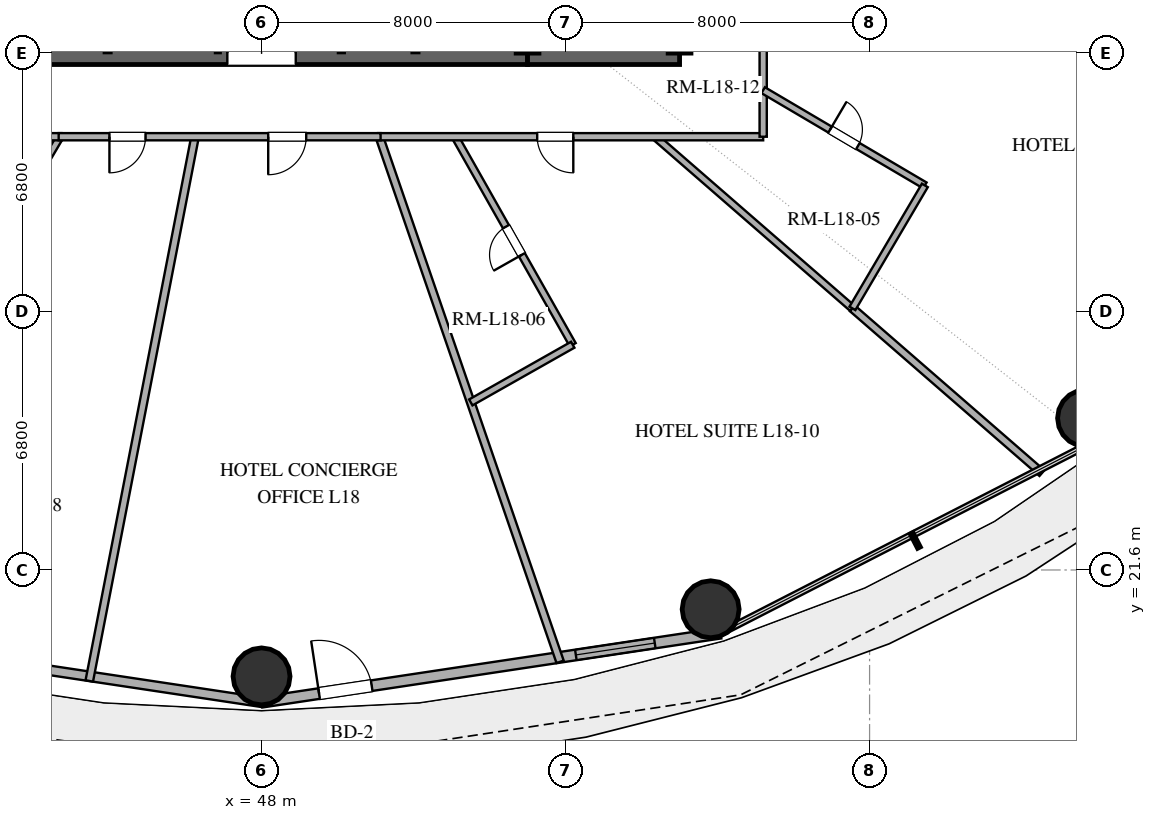
"""IFC4 building model, lengths in metres.
Left out: names, types, materials, properties, quantities, classifications, styles, units other than length and angle.
Written with IfcOpenShell. Run it as: python <this file> out.ifc"""

import sys

from ifc_helpers import new_model, si_unit, direction, frame, frame_2d, origin, origin_2d, place, context, subcontext, project, spatial, rectangle, hollow_circle, extrude, element, fill, save


model = new_model("IFC4")
c1 = context("Model", 3, precision=1e-05, world=origin(), true_north=direction((0.0, 1.0)))
c2 = subcontext(c1, "Body", "Model", "MODEL_VIEW")
j1 = project(units=[si_unit("LENGTHUNIT", "METRE"), si_unit("PLANEANGLEUNIT", "RADIAN")], contexts=[c1])
p1 = place(None, origin())
s1 = spatial("IfcSite", under=j1, at=p1, CompositionType="ELEMENT")
p2 = place(p1, origin())
s2 = spatial("IfcBuilding", under=s1, at=p2, CompositionType="ELEMENT")
p3 = place(p2, frame((0.0, 0.0, 75.0)))
s3 = spatial("IfcBuildingStorey", under=s2, at=p3, CompositionType="ELEMENT", Elevation=75.0)
p4 = place(p3, frame((41.0, 35.2, 0.0), z_axis=(0.0, 0.0, 1.0), x_axis=(1.0, 0.0, 0.0)))
e1 = element("IfcWall", 1, at=p4, inside=s3, PredefinedType="SHEAR", context=c2, shape_type="SweptSolid", body=[
    extrude(rectangle(XDim=14.0, YDim=0.6, at=frame_2d((7.0, 0.0))), origin(), (0.0, 0.0, 1.0), 3.25),
])
p5 = place(p4, frame((6.1, 0.0, 0.0)))
e2 = element("IfcOpeningElement", 2, at=p5, cuts=e1, PredefinedType="OPENING", context=c2, shape_type="SweptSolid", body=[
    extrude(rectangle(XDim=1.8, YDim=2.25, at=frame_2d((0.9, 1.125))), frame((0.0, 0.31, 0.0), z_axis=(0.0, -1.0, 0.0), x_axis=(1.0, 0.0, 0.0)), (0.0, 0.0, 1.0), 0.62),
])
p6 = place(p3, frame((55.0, 35.2, 0.0), z_axis=(0.0, 0.0, 1.0), x_axis=(1.0, 0.0, 0.0)))
e3 = element("IfcWall", 3, at=p6, inside=s3, PredefinedType="SHEAR", context=c2, shape_type="SweptSolid", body=[
    extrude(rectangle(XDim=4.0, YDim=0.6, at=frame_2d((2.0, 0.0))), origin(), (0.0, 0.0, 1.0), 3.25),
])
p7 = place(p3, frame((59.0, 35.2, 0.0), z_axis=(0.0, 0.0, 1.0), x_axis=(0.0, 1.0, 0.0)))
e4 = element("IfcWall", 4, at=p7, inside=s3, PredefinedType="SHEAR", context=c2, shape_type="SweptSolid", body=[
    extrude(rectangle(XDim=13.6, YDim=0.6, at=frame_2d((6.8, 0.0))), origin(), (0.0, 0.0, 1.0), 3.25),
])
p8 = place(p7, frame((1.5, 0.0, 0.0)))
e5 = element("IfcOpeningElement", 5, at=p8, cuts=e4, PredefinedType="OPENING", context=c2, shape_type="SweptSolid", body=[
    extrude(rectangle(XDim=1.2, YDim=2.15, at=frame_2d((0.6, 1.075))), frame((0.0, 0.31, 0.0), z_axis=(0.0, -1.0, 0.0), x_axis=(1.0, 0.0, 0.0)), (0.0, 0.0, 1.0), 0.62),
])
p9 = place(p3, frame((55.0, 35.2, 0.0), z_axis=(0.0, 0.0, 1.0), x_axis=(0.0, 1.0, 0.0)))
e6 = element("IfcWall", 6, at=p9, inside=s3, PredefinedType="SHEAR", context=c2, shape_type="SweptSolid", body=[
    extrude(rectangle(XDim=13.6, YDim=0.6, at=frame_2d((6.8, 0.0))), origin(), (0.0, 0.0, 1.0), 3.25),
])
p10 = place(p9, frame((1.15, 0.0, 0.0)))
e7 = element("IfcOpeningElement", 7, at=p10, cuts=e6, PredefinedType="OPENING", context=c2, shape_type="SweptSolid", body=[
    extrude(rectangle(XDim=1.1, YDim=2.2, at=frame_2d((0.55, 1.1))), frame((0.0, 0.31, 0.0), z_axis=(0.0, -1.0, 0.0), x_axis=(1.0, 0.0, 0.0)), (0.0, 0.0, 1.0), 0.62),
])
for number, where, z_axis, x_axis in (
    (8, (48.0, 18.8, 0.0), (0.0, 0.0, 1.0), (1.0, 0.0, 0.0)),
    (9, (59.818, 20.566, 0.0), (0.0, 0.0, 1.0), (1.0, 0.0, 0.0)),
    (10, (69.697, 25.595, 0.0), (0.0, 0.0, 1.0), (1.0, 0.0, 0.0)),
):
    element("IfcColumn", number, at=place(p3, frame(where, z_axis=z_axis, x_axis=x_axis)), inside=s3, PredefinedType="COLUMN", context=c2, shape_type="SweptSolid", body=[
        extrude(hollow_circle(Radius=0.75, WallThickness=0.04, at=origin_2d()), origin(), (0.0, 0.0, 1.0), 3.25),
    ])
p11 = place(p3, frame((35.922, 19.938, 0.0), z_axis=(0.0, 0.0, 1.0), x_axis=(0.988864835849, -0.148816452121, 0.0)))
e11 = element("IfcWall", 11, at=p11, inside=s3, PredefinedType="SOLIDWALL", context=c2, shape_type="SweptSolid", body=[
    extrude(rectangle(XDim=12.214, YDim=0.25, at=frame_2d((6.107, 0.0))), origin(), (0.0, 0.0, 1.0), 3.25),
])
p12 = place(p3, frame((48.0, 18.12, 0.0), z_axis=(0.0, 0.0, 1.0), x_axis=(0.988864835849, 0.148816452121, 0.0)))
e12 = element("IfcWall", 12, at=p12, inside=s3, PredefinedType="SOLIDWALL", context=c2, shape_type="SweptSolid", body=[
    extrude(rectangle(XDim=12.214, YDim=0.28, at=frame_2d((6.107, 0.0))), origin(), (0.0, 0.0, 1.0), 3.25),
])
p13 = place(p12, frame((1.531, 0.0, 0.0)))
e13 = element("IfcOpeningElement", 13, at=p13, cuts=e12, PredefinedType="OPENING", context=c2, shape_type="SweptSolid", body=[
    extrude(rectangle(XDim=1.4, YDim=2.2, at=frame_2d((0.7, 1.1))), frame((0.0, 0.15, 0.0), z_axis=(0.0, -1.0, 0.0), x_axis=(1.0, 0.0, 0.0)), (0.0, 0.0, 1.0), 0.3),
])
p14 = place(p12, frame((8.364, 0.0, 0.85)))
e14 = element("IfcOpeningElement", 14, at=p14, cuts=e12, PredefinedType="OPENING", context=c2, shape_type="SweptSolid", body=[
    extrude(rectangle(XDim=2.1, YDim=2.2, at=frame_2d((1.05, 1.1))), frame((0.0, 0.15, 0.0), z_axis=(0.0, -1.0, 0.0), x_axis=(1.0, 0.0, 0.0)), (0.0, 0.0, 1.0), 0.3),
])
for number, where, z_axis, x_axis in (
    (15, (43.95, 35.2, 0.0), (0.0, 0.0, 1.0), (0.0, 1.0, 0.0)),
    (16, (52.05, 35.2, 0.0), (0.0, 0.0, 1.0), (0.0, 1.0, 0.0)),
):
    element("IfcWall", number, at=place(p3, frame(where, z_axis=z_axis, x_axis=x_axis)), inside=s3, PredefinedType="SOLIDWALL", context=c2, shape_type="SweptSolid", body=[
        extrude(rectangle(XDim=3.2, YDim=0.2, at=frame_2d((1.6, 0.0))), origin(), (0.0, 0.0, 1.0), 2.61),
    ])
p15 = place(p3, frame((46.85, 35.2, 0.0), z_axis=(0.0, 0.0, 1.0), x_axis=(0.0, 1.0, 0.0)))
e17 = element("IfcWall", 17, at=p15, inside=s3, PredefinedType="PARTITIONING", context=c2, shape_type="SweptSolid", body=[
    extrude(rectangle(XDim=3.2, YDim=0.15, at=frame_2d((1.6, 0.0))), origin(), (0.0, 0.0, 1.0), 2.61),
])
p16 = place(p15, frame((1.15, 0.0, 0.0)))
e18 = element("IfcOpeningElement", 18, at=p16, cuts=e17, PredefinedType="OPENING", context=c2, shape_type="SweptSolid", body=[
    extrude(rectangle(XDim=0.9, YDim=2.15, at=frame_2d((0.45, 1.075))), frame((0.0, 0.085, 0.0), z_axis=(0.0, -1.0, 0.0), x_axis=(1.0, 0.0, 0.0)), (0.0, 0.0, 1.0), 0.17),
])
p17 = place(p3, frame((50.1, 35.2, 0.0), z_axis=(0.0, 0.0, 1.0), x_axis=(0.0, 1.0, 0.0)))
e19 = element("IfcWall", 19, at=p17, inside=s3, PredefinedType="PLUMBINGWALL", context=c2, shape_type="SweptSolid", body=[
    extrude(rectangle(XDim=2.45, YDim=0.18, at=frame_2d((1.225, 0.0))), origin(), (0.0, 0.0, 1.0), 2.61),
])
p18 = place(p17, frame((0.75, 0.0, 0.0)))
e20 = element("IfcOpeningElement", 20, at=p18, cuts=e19, PredefinedType="OPENING", context=c2, shape_type="SweptSolid", body=[
    extrude(rectangle(XDim=0.85, YDim=2.1, at=frame_2d((0.425, 1.05))), frame((0.0, 0.1, 0.0), z_axis=(0.0, -1.0, 0.0), x_axis=(1.0, 0.0, 0.0)), (0.0, 0.0, 1.0), 0.2),
])
p19 = place(p3, frame((43.467, 18.681, 0.0), z_axis=(0.0, 0.0, 1.0), x_axis=(0.190799326792, 0.981629062781, 0.0)))
e21 = element("IfcWall", 21, at=p19, inside=s3, PredefinedType="PARTITIONING", context=c2, shape_type="SweptSolid", body=[
    extrude(rectangle(XDim=14.587, YDim=0.2, at=frame_2d((7.293, 0.0))), origin(), (0.0, 0.0, 1.0), 2.61),
])
p20 = place(p3, frame((51.099, 33.0, 0.0), z_axis=(0.0, 0.0, 1.0), x_axis=(0.325569992405, -0.945517942741, 0.0)))
e22 = element("IfcWall", 22, at=p20, inside=s3, PredefinedType="PARTITIONING", context=c2, shape_type="SweptSolid", body=[
    extrude(rectangle(XDim=14.613, YDim=0.2, at=frame_2d((7.307, 0.0))), origin(), (0.0, 0.0, 1.0), 2.61),
])
p21 = place(p3, frame((39.193, 27.048, 0.0), z_axis=(0.0, 0.0, 1.0), x_axis=(0.507529744585, 0.861634236995, 0.0)))
e23 = element("IfcWall", 23, at=p21, inside=s3, PredefinedType="PLUMBINGWALL", context=c2, shape_type="SweptSolid", body=[
    extrude(rectangle(XDim=6.908, YDim=0.18, at=frame_2d((3.454, 0.0))), origin(), (0.0, 0.0, 1.0), 2.61),
])
p22 = place(p21, frame((3.029, 0.0, 0.0)))
e24 = element("IfcOpeningElement", 24, at=p22, cuts=e23, PredefinedType="OPENING", context=c2, shape_type="SweptSolid", body=[
    extrude(rectangle(XDim=0.85, YDim=2.1, at=frame_2d((0.425, 1.05))), frame((0.0, 0.1, 0.0), z_axis=(0.0, -1.0, 0.0), x_axis=(1.0, 0.0, 0.0)), (0.0, 0.0, 1.0), 0.2),
])
p23 = place(p3, frame((63.549, 28.484, 0.0), z_axis=(0.0, 0.0, 1.0), x_axis=(-0.754699426586, 0.65607070923, 0.0)))
e25 = element("IfcWall", 25, at=p23, inside=s3, PredefinedType="PLUMBINGWALL", context=c2, shape_type="SweptSolid", body=[
    extrude(rectangle(XDim=6.884, YDim=0.18, at=frame_2d((3.442, 0.0))), origin(), (0.0, 0.0, 1.0), 2.61),
])
p24 = place(p3, frame((68.535, 24.149, 0.0), z_axis=(0.0, 0.0, 1.0), x_axis=(-0.754728806145, 0.656036911442, 0.0)))
e26 = element("IfcWall", 26, at=p24, inside=s3, PredefinedType="PARTITIONING", context=c2, shape_type="SweptSolid", body=[
    extrude(rectangle(XDim=6.607, YDim=0.2, at=frame_2d((3.304, 0.0))), origin(), (0.0, 0.0, 1.0), 2.61),
])
p25 = place(p3, frame((56.189, 27.527, 0.0), z_axis=(0.0, 0.0, 1.0), x_axis=(-0.492421798109, 0.870356692826, 0.0)))
e27 = element("IfcWall", 27, at=p25, inside=s3, PredefinedType="PLUMBINGWALL", context=c2, shape_type="SweptSolid", body=[
    extrude(rectangle(XDim=6.289, YDim=0.18, at=frame_2d((3.144, 0.0))), origin(), (0.0, 0.0, 1.0), 2.61),
])
p26 = place(p25, frame((2.719, 0.0, 0.0)))
e28 = element("IfcOpeningElement", 28, at=p26, cuts=e27, PredefinedType="OPENING", context=c2, shape_type="SweptSolid", body=[
    extrude(rectangle(XDim=0.85, YDim=2.1, at=frame_2d((0.425, 1.05))), frame((0.0, 0.1, 0.0), z_axis=(0.0, -1.0, 0.0), x_axis=(1.0, 0.0, 0.0)), (0.0, 0.0, 1.0), 0.2),
])
p27 = place(p3, frame((42.736, 33.0, 0.0), z_axis=(0.0, 0.0, 1.0), x_axis=(-1.0, 0.0, 0.0)))
e29 = element("IfcWall", 29, at=p27, inside=s3, PredefinedType="PARTITIONING", context=c2, shape_type="SweptSolid", body=[
    extrude(rectangle(XDim=7.936, YDim=0.19, at=frame_2d((3.968, 0.0))), origin(), (0.0, 0.0, 1.0), 2.61),
])
p28 = place(p27, frame((4.751, 0.0, 0.0)))
e30 = element("IfcOpeningElement", 30, at=p28, cuts=e29, PredefinedType="OPENING", context=c2, shape_type="SweptSolid", body=[
    extrude(rectangle(XDim=0.95, YDim=2.15, at=frame_2d((0.475, 1.075))), frame((0.0, 0.105, 0.0), z_axis=(0.0, -1.0, 0.0), x_axis=(1.0, 0.0, 0.0)), (0.0, 0.0, 1.0), 0.21),
])
p29 = place(p3, frame((61.2, 33.0, 0.0), z_axis=(0.0, 0.0, 1.0), x_axis=(-1.0, 0.0, 0.0)))
e31 = element("IfcWall", 31, at=p29, inside=s3, PredefinedType="PARTITIONING", context=c2, shape_type="SweptSolid", body=[
    extrude(rectangle(XDim=10.135, YDim=0.19, at=frame_2d((5.067, 0.0))), origin(), (0.0, 0.0, 1.0), 2.61),
])
p30 = place(p29, frame((4.996, 0.0, 0.0)))
e32 = element("IfcOpeningElement", 32, at=p30, cuts=e31, PredefinedType="OPENING", context=c2, shape_type="SweptSolid", body=[
    extrude(rectangle(XDim=0.95, YDim=2.15, at=frame_2d((0.475, 1.075))), frame((0.0, 0.105, 0.0), z_axis=(0.0, -1.0, 0.0), x_axis=(1.0, 0.0, 0.0)), (0.0, 0.0, 1.0), 0.21),
])
p31 = place(p3, frame((61.2, 41.917, 0.0), z_axis=(0.0, 0.0, 1.0), x_axis=(0.0, -1.0, 0.0)))
e33 = element("IfcWall", 33, at=p31, inside=s3, PredefinedType="PARTITIONING", context=c2, shape_type="SweptSolid", body=[
    extrude(rectangle(XDim=8.917, YDim=0.19, at=frame_2d((4.458, 0.0))), origin(), (0.0, 0.0, 1.0), 2.61),
])
p32 = place(p31, frame((4.615, 0.0, 0.0)))
e34 = element("IfcOpeningElement", 34, at=p32, cuts=e33, PredefinedType="OPENING", context=c2, shape_type="SweptSolid", body=[
    extrude(rectangle(XDim=0.95, YDim=2.15, at=frame_2d((0.475, 1.075))), frame((0.0, 0.105, 0.0), z_axis=(0.0, -1.0, 0.0), x_axis=(1.0, 0.0, 0.0)), (0.0, 0.0, 1.0), 0.21),
])
p33 = place(p3, frame((61.2, 34.225, 0.0), z_axis=(0.0, 0.0, 1.0), x_axis=(0.861622640197, -0.507549431977, 0.0)))
e35 = element("IfcWall", 35, at=p33, inside=s3, PredefinedType="PLUMBINGWALL", context=c2, shape_type="SweptSolid", body=[
    extrude(rectangle(XDim=4.938, YDim=0.18, at=frame_2d((2.469, 0.0))), origin(), (0.0, 0.0, 1.0), 2.61),
])
p34 = place(p33, frame((2.044, 0.0, 0.0)))
e36 = element("IfcOpeningElement", 36, at=p34, cuts=e35, PredefinedType="OPENING", context=c2, shape_type="SweptSolid", body=[
    extrude(rectangle(XDim=0.85, YDim=2.1, at=frame_2d((0.425, 1.05))), frame((0.0, 0.1, 0.0), z_axis=(0.0, -1.0, 0.0), x_axis=(1.0, 0.0, 0.0)), (0.0, 0.0, 1.0), 0.2),
])
p35 = place(p3, frame((51.133, 33.0, 0.0), z_axis=(0.0, 0.0, 1.0), x_axis=(-1.0, 0.0, 0.0)))
e37 = element("IfcWall", 37, at=p35, inside=s3, PredefinedType="PARTITIONING", context=c2, shape_type="SweptSolid", body=[
    extrude(rectangle(XDim=8.471, YDim=0.19, at=frame_2d((4.236, 0.0))), origin(), (0.0, 0.0, 1.0), 2.61),
])
p36 = place(p35, frame((1.957, 0.0, 0.0)))
e38 = element("IfcOpeningElement", 38, at=p36, cuts=e37, PredefinedType="OPENING", context=c2, shape_type="SweptSolid", body=[
    extrude(rectangle(XDim=1.0, YDim=2.2, at=frame_2d((0.5, 1.1))), frame((0.0, 0.105, 0.0), z_axis=(0.0, -1.0, 0.0), x_axis=(1.0, 0.0, 0.0)), (0.0, 0.0, 1.0), 0.21),
])
p37 = place(p35, frame((6.185, 0.0, 0.0)))
e39 = element("IfcOpeningElement", 39, at=p37, cuts=e37, PredefinedType="OPENING", context=c2, shape_type="SweptSolid", body=[
    extrude(rectangle(XDim=0.95, YDim=2.15, at=frame_2d((0.475, 1.075))), frame((0.0, 0.105, 0.0), z_axis=(0.0, -1.0, 0.0), x_axis=(1.0, 0.0, 0.0)), (0.0, 0.0, 1.0), 0.21),
])
p38 = place(p3, frame((65.454, 31.719, 0.0), z_axis=(0.0, 0.0, 1.0), x_axis=(-0.507594049508, -0.861596356134, 0.0)))
e40 = element("IfcWall", 40, at=p38, inside=s3, PredefinedType="PLUMBINGWALL", context=c2, shape_type="SweptSolid", body=[
    extrude(rectangle(XDim=3.754, YDim=0.18, at=frame_2d((1.877, 0.0))), origin(), (0.0, 0.0, 1.0), 2.61),
])
p39 = place(p3, frame((53.506, 26.009, 0.0), z_axis=(0.0, 0.0, 1.0), x_axis=(0.87034589465, 0.492440883422, 0.0)))
e41 = element("IfcWall", 41, at=p39, inside=s3, PredefinedType="PLUMBINGWALL", context=c2, shape_type="SweptSolid", body=[
    extrude(rectangle(XDim=3.082, YDim=0.18, at=frame_2d((1.541, 0.0))), origin(), (0.0, 0.0, 1.0), 2.61),
])
p40 = place(p13, origin())
e42 = element("IfcDoor", 42, at=p40, inside=s3, OperationType="SINGLE_SWING_LEFT", PredefinedType="DOOR", context=c2, shape_type="SweptSolid", body=[
    extrude(rectangle(XDim=1.4, YDim=2.2, at=frame_2d((0.7, 1.1))), frame((0.0, 0.025, 0.0), z_axis=(0.0, -1.0, 0.0), x_axis=(1.0, 0.0, 0.0)), (0.0, 0.0, 1.0), 0.05),
])
fill(e13, e42)
p41 = place(p14, origin())
e43 = element("IfcWindow", 43, at=p41, inside=s3, PartitioningType="SINGLE_PANEL", PredefinedType="WINDOW", context=c2, shape_type="SweptSolid", body=[
    extrude(rectangle(XDim=2.1, YDim=2.2, at=frame_2d((1.05, 1.1))), frame((0.0, 0.03, 0.0), z_axis=(0.0, -1.0, 0.0), x_axis=(1.0, 0.0, 0.0)), (0.0, 0.0, 1.0), 0.06),
])
fill(e14, e43)
p42 = place(p5, origin())
e44 = element("IfcDoor", 44, at=p42, inside=s3, OperationType="DOUBLE_DOOR_SINGLE_SWING", PredefinedType="DOOR", context=c2, shape_type="SweptSolid", body=[
    extrude(rectangle(XDim=1.8, YDim=2.25, at=frame_2d((0.9, 1.125))), frame((0.0, 0.025, 0.0), z_axis=(0.0, -1.0, 0.0), x_axis=(1.0, 0.0, 0.0)), (0.0, 0.0, 1.0), 0.05),
])
fill(e2, e44)
p43 = place(p26, origin())
e45 = element("IfcDoor", 45, at=p43, inside=s3, OperationType="SINGLE_SWING_LEFT", PredefinedType="DOOR", context=c2, shape_type="SweptSolid", body=[
    extrude(rectangle(XDim=0.85, YDim=2.1, at=frame_2d((0.425, 1.05))), frame((0.0, 0.025, 0.0), z_axis=(0.0, -1.0, 0.0), x_axis=(1.0, 0.0, 0.0)), (0.0, 0.0, 1.0), 0.05),
])
fill(e28, e45)
p44 = place(p30, origin())
e46 = element("IfcDoor", 46, at=p44, inside=s3, OperationType="SINGLE_SWING_LEFT", PredefinedType="DOOR", context=c2, shape_type="SweptSolid", body=[
    extrude(rectangle(XDim=0.95, YDim=2.15, at=frame_2d((0.475, 1.075))), frame((0.0, 0.025, 0.0), z_axis=(0.0, -1.0, 0.0), x_axis=(1.0, 0.0, 0.0)), (0.0, 0.0, 1.0), 0.05),
])
fill(e32, e46)
p45 = place(p34, origin())
e47 = element("IfcDoor", 47, at=p45, inside=s3, OperationType="SINGLE_SWING_LEFT", PredefinedType="DOOR", context=c2, shape_type="SweptSolid", body=[
    extrude(rectangle(XDim=0.85, YDim=2.1, at=frame_2d((0.425, 1.05))), frame((0.0, 0.025, 0.0), z_axis=(0.0, -1.0, 0.0), x_axis=(1.0, 0.0, 0.0)), (0.0, 0.0, 1.0), 0.05),
])
fill(e36, e47)
p46 = place(p36, origin())
e48 = element("IfcDoor", 48, at=p46, inside=s3, OperationType="SINGLE_SWING_RIGHT", PredefinedType="DOOR", context=c2, shape_type="SweptSolid", body=[
    extrude(rectangle(XDim=1.0, YDim=2.2, at=frame_2d((0.5, 1.1))), frame((0.0, 0.025, 0.0), z_axis=(0.0, -1.0, 0.0), x_axis=(1.0, 0.0, 0.0)), (0.0, 0.0, 1.0), 0.05),
])
fill(e38, e48)
p47 = place(p37, origin())
e49 = element("IfcDoor", 49, at=p47, inside=s3, OperationType="SINGLE_SWING_RIGHT", PredefinedType="DOOR", context=c2, shape_type="SweptSolid", body=[
    extrude(rectangle(XDim=0.95, YDim=2.15, at=frame_2d((0.475, 1.075))), frame((0.0, 0.025, 0.0), z_axis=(0.0, -1.0, 0.0), x_axis=(1.0, 0.0, 0.0)), (0.0, 0.0, 1.0), 0.05),
])
fill(e39, e49)
save(model, sys.argv[1])
